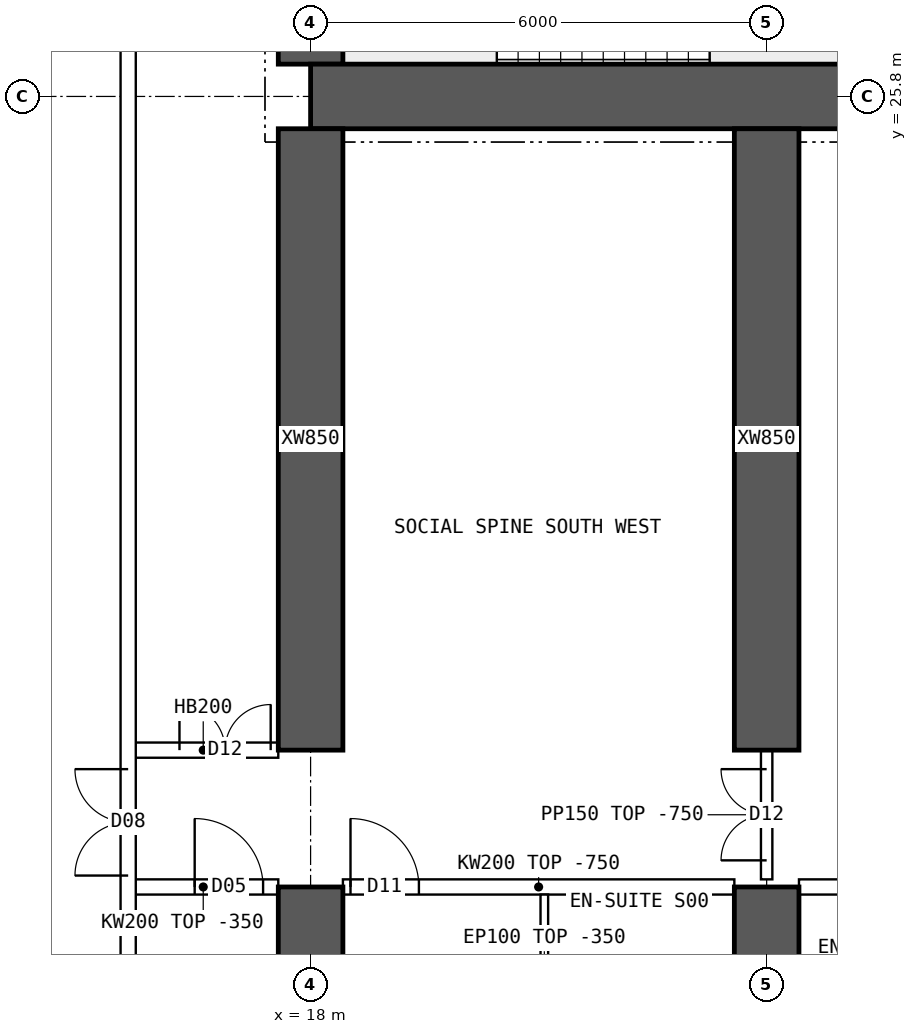
"""IFC4 building model, lengths in metres.
Left out: names, types, materials, properties, quantities, classifications, styles, units other than length and angle.
Written with IfcOpenShell. Run it as: python <this file> out.ifc"""

import sys

from ifc_helpers import new_model, si_unit, direction, frame, frame_2d, origin, place, context, subcontext, project, spatial, polyline, rectangle, outline, extrude, element, fill, save


model = new_model("IFC4")
c1 = context("Model", 3, precision=1e-05, world=origin(), true_north=direction((0.0, 1.0)))
c2 = subcontext(c1, "Body", "Model", "MODEL_VIEW")
j1 = project(units=[si_unit("LENGTHUNIT", "METRE"), si_unit("PLANEANGLEUNIT", "RADIAN")], contexts=[c1])
p1 = place(None, origin())
s1 = spatial("IfcSite", under=j1, at=p1, CompositionType="ELEMENT")
p2 = place(p1, origin())
s2 = spatial("IfcBuilding", under=s1, at=p2, CompositionType="ELEMENT")
p3 = place(p2, frame((0.0, 0.0, 197.35)))
s3 = spatial("IfcBuildingStorey", under=s2, at=p3, CompositionType="ELEMENT", Elevation=197.35)
p4 = place(p3, frame((18.0, 25.8, 0.0), z_axis=(0.0, 0.0, 1.0), x_axis=(1.0, 0.0, 0.0)))
e1 = element("IfcWall", 1, at=p4, inside=s3, PredefinedType="SHEAR", context=c2, shape_type="SweptSolid", body=[
    extrude(rectangle(XDim=48.0, YDim=0.85, at=frame_2d((24.0, 0.0))), origin(), (0.0, 0.0, 1.0), 3.75),
])
p5 = place(p3, frame((18.0, 26.225, 0.0), z_axis=(0.0, 0.0, 1.0), x_axis=(0.0, 1.0, 0.0)))
e2 = element("IfcWall", 2, at=p5, inside=s3, PredefinedType="SHEAR", context=c2, shape_type="SweptSolid", body=[
    extrude(rectangle(XDim=11.55, YDim=0.85, at=frame_2d((5.775, 0.0))), origin(), (0.0, 0.0, 1.0), 3.75),
])
p6 = place(p5, frame((5.075, 0.0, 0.0)))
e3 = element("IfcOpeningElement", 3, at=p6, cuts=e2, PredefinedType="OPENING", context=c2, shape_type="SweptSolid", body=[
    extrude(rectangle(XDim=1.2, YDim=2.1, at=frame_2d((0.6, 1.05))), frame((0.0, 0.435, 0.0), z_axis=(0.0, -1.0, 0.0), x_axis=(1.0, 0.0, 0.0)), (0.0, 0.0, 1.0), 0.87),
])
p7 = place(p3, frame((18.0, 10.0, 0.0), z_axis=(0.0, 0.0, 1.0), x_axis=(0.0, 1.0, 0.0)))
e4 = element("IfcWall", 4, at=p7, inside=s3, PredefinedType="SHEAR", context=c2, shape_type="SweptSolid", body=[
    extrude(rectangle(XDim=5.4, YDim=0.85, at=frame_2d((2.7, 0.0))), origin(), (0.0, 0.0, 1.0), 3.75),
])
p8 = place(p3, frame((18.0, 17.2, 0.0), z_axis=(0.0, 0.0, 1.0), x_axis=(0.0, 1.0, 0.0)))
e5 = element("IfcWall", 5, at=p8, inside=s3, PredefinedType="SHEAR", context=c2, shape_type="SweptSolid", body=[
    extrude(rectangle(XDim=8.175, YDim=0.85, at=frame_2d((4.087, 0.0))), origin(), (0.0, 0.0, 1.0), 3.75),
])
p9 = place(p3, frame((24.0, 10.0, 0.0), z_axis=(0.0, 0.0, 1.0), x_axis=(0.0, 1.0, 0.0)))
e6 = element("IfcWall", 6, at=p9, inside=s3, PredefinedType="SHEAR", context=c2, shape_type="SweptSolid", body=[
    extrude(rectangle(XDim=5.4, YDim=0.85, at=frame_2d((2.7, 0.0))), origin(), (0.0, 0.0, 1.0), 3.75),
])
p10 = place(p3, frame((24.0, 17.2, 0.0), z_axis=(0.0, 0.0, 1.0), x_axis=(0.0, 1.0, 0.0)))
e7 = element("IfcWall", 7, at=p10, inside=s3, PredefinedType="SHEAR", context=c2, shape_type="SweptSolid", body=[
    extrude(rectangle(XDim=8.175, YDim=0.85, at=frame_2d((4.087, 0.0))), origin(), (0.0, 0.0, 1.0), 3.75),
])
p11 = place(p3, frame((15.6, 15.4, 0.0), z_axis=(0.0, 0.0, 1.0), x_axis=(1.0, 0.0, 0.0)))
e8 = element("IfcWall", 8, at=p11, inside=s3, PredefinedType="SOLIDWALL", context=c2, shape_type="SweptSolid", body=[
    extrude(rectangle(XDim=1.975, YDim=0.2, at=frame_2d((0.987, 0.0))), origin(), (0.0, 0.0, 1.0), 3.4),
])
p12 = place(p11, frame((0.875, 0.0, 0.0)))
e9 = element("IfcOpeningElement", 9, at=p12, cuts=e8, PredefinedType="OPENING", context=c2, shape_type="SweptSolid", body=[
    extrude(rectangle(XDim=0.9, YDim=2.1, at=frame_2d((0.45, 1.05))), frame((0.0, 0.11, 0.0), z_axis=(0.0, -1.0, 0.0), x_axis=(1.0, 0.0, 0.0)), (0.0, 0.0, 1.0), 0.22),
])
p13 = place(p3, frame((15.6, 17.2, 0.0), z_axis=(0.0, 0.0, 1.0), x_axis=(1.0, 0.0, 0.0)))
e10 = element("IfcWall", 10, at=p13, inside=s3, PredefinedType="SOLIDWALL", context=c2, shape_type="SweptSolid", body=[
    extrude(rectangle(XDim=1.975, YDim=0.2, at=frame_2d((0.987, 0.0))), origin(), (0.0, 0.0, 1.0), 3.4),
])
p14 = place(p13, frame((0.675, 0.0, 0.0)))
e11 = element("IfcOpeningElement", 11, at=p14, cuts=e10, PredefinedType="OPENING", context=c2, shape_type="SweptSolid", body=[
    extrude(rectangle(XDim=1.2, YDim=2.1, at=frame_2d((0.6, 1.05))), frame((0.0, 0.11, 0.0), z_axis=(0.0, -1.0, 0.0), x_axis=(1.0, 0.0, 0.0)), (0.0, 0.0, 1.0), 0.22),
])
p15 = place(p3, frame((18.425, 15.4, 0.0), z_axis=(0.0, 0.0, 1.0), x_axis=(1.0, 0.0, 0.0)))
e12 = element("IfcWall", 12, at=p15, inside=s3, PredefinedType="SOLIDWALL", context=c2, shape_type="SweptSolid", body=[
    extrude(outline(polyline([(0.0, 0.0), (5.15, 0.0), (5.15, 3.0), (0.0, 3.0), (0.0, 0.0)])), frame((0.0, 0.1, 0.0), z_axis=(0.0, -1.0, 0.0), x_axis=(1.0, 0.0, 0.0)), (0.0, 0.0, 1.0), 0.2),
])
p16 = place(p15, frame((0.1, 0.0, 0.0)))
e13 = element("IfcOpeningElement", 13, at=p16, cuts=e12, PredefinedType="OPENING", context=c2, shape_type="SweptSolid", body=[
    extrude(rectangle(XDim=0.9, YDim=2.1, at=frame_2d((0.45, 1.05))), frame((0.0, 0.11, 0.0), z_axis=(0.0, -1.0, 0.0), x_axis=(1.0, 0.0, 0.0)), (0.0, 0.0, 1.0), 0.22),
])
p17 = place(p3, frame((24.425, 15.4, 0.0), z_axis=(0.0, 0.0, 1.0), x_axis=(1.0, 0.0, 0.0)))
e14 = element("IfcWall", 14, at=p17, inside=s3, PredefinedType="SOLIDWALL", context=c2, shape_type="SweptSolid", body=[
    extrude(outline(polyline([(0.0, 0.0), (5.15, 0.0), (5.15, 3.0), (0.0, 3.0), (0.0, 0.0)])), frame((0.0, 0.1, 0.0), z_axis=(0.0, -1.0, 0.0), x_axis=(1.0, 0.0, 0.0)), (0.0, 0.0, 1.0), 0.2),
])
p18 = place(p17, frame((1.3, 0.0, 0.0)))
e15 = element("IfcOpeningElement", 15, at=p18, cuts=e14, PredefinedType="OPENING", context=c2, shape_type="SweptSolid", body=[
    extrude(rectangle(XDim=0.9, YDim=2.1, at=frame_2d((0.45, 1.05))), frame((0.0, 0.11, 0.0), z_axis=(0.0, -1.0, 0.0), x_axis=(1.0, 0.0, 0.0)), (0.0, 0.0, 1.0), 0.22),
])
p19 = place(p17, frame((2.75, 0.0, 0.0)))
e16 = element("IfcOpeningElement", 16, at=p19, cuts=e14, PredefinedType="OPENING", context=c2, shape_type="SweptSolid", body=[
    extrude(rectangle(XDim=0.9, YDim=2.1, at=frame_2d((0.45, 1.05))), frame((0.0, 0.11, 0.0), z_axis=(0.0, -1.0, 0.0), x_axis=(1.0, 0.0, 0.0)), (0.0, 0.0, 1.0), 0.22),
])
p20 = place(p3, frame((21.075, 13.55, 0.0), z_axis=(0.0, 0.0, 1.0), x_axis=(0.0, 1.0, 0.0)))
e17 = element("IfcWall", 17, at=p20, inside=s3, PredefinedType="PARTITIONING", context=c2, shape_type="SweptSolid", body=[
    extrude(outline(polyline([(0.0, 0.0), (1.75, 0.0), (1.75, 3.0), (1.702, 3.0), (1.7, 3.4), (0.0, 3.4), (0.0, 0.0)])), frame((0.0, 0.05, 0.0), z_axis=(0.0, -1.0, 0.0), x_axis=(1.0, 0.0, 0.0)), (0.0, 0.0, 1.0), 0.1),
])
p21 = place(p3, frame((24.0, 15.5, 0.0), z_axis=(0.0, 0.0, 1.0), x_axis=(0.0, 1.0, 0.0)))
e18 = element("IfcWall", 18, at=p21, inside=s3, PredefinedType="PARTITIONING", context=c2, shape_type="SweptSolid", body=[
    extrude(outline(polyline([(0.0, 0.0), (1.7, 0.0), (1.7, 3.0), (0.0, 3.0), (0.0, 0.0)])), frame((0.0, 0.075, 0.0), z_axis=(0.0, -1.0, 0.0), x_axis=(1.0, 0.0, 0.0)), (0.0, 0.0, 1.0), 0.15),
])
p22 = place(p21, frame((0.25, 0.0, 0.0)))
e19 = element("IfcOpeningElement", 19, at=p22, cuts=e18, PredefinedType="OPENING", context=c2, shape_type="SweptSolid", body=[
    extrude(rectangle(XDim=1.2, YDim=2.1, at=frame_2d((0.6, 1.05))), frame((0.0, 0.085, 0.0), z_axis=(0.0, -1.0, 0.0), x_axis=(1.0, 0.0, 0.0)), (0.0, 0.0, 1.0), 0.17),
])
p23 = place(p3, frame((15.6, 10.446, 0.0), z_axis=(0.0, 0.0, 1.0), x_axis=(0.0, 1.0, 0.0)))
e20 = element("IfcWall", 20, at=p23, inside=s3, PredefinedType="SOLIDWALL", context=c2, shape_type="SweptSolid", body=[
    extrude(rectangle(XDim=43.107, YDim=0.2, at=frame_2d((21.554, 0.0))), origin(), (0.0, 0.0, 1.0), 3.4),
])
p24 = place(p23, frame((5.104, 0.0, 0.0)))
e21 = element("IfcOpeningElement", 21, at=p24, cuts=e20, PredefinedType="OPENING", context=c2, shape_type="SweptSolid", body=[
    extrude(rectangle(XDim=1.4, YDim=2.1, at=frame_2d((0.7, 1.05))), frame((0.0, 0.11, 0.0), z_axis=(0.0, -1.0, 0.0), x_axis=(1.0, 0.0, 0.0)), (0.0, 0.0, 1.0), 0.22),
])
p25 = place(p23, frame((36.504, 0.0, 0.0)))
e22 = element("IfcOpeningElement", 22, at=p25, cuts=e20, PredefinedType="OPENING", context=c2, shape_type="SweptSolid", body=[
    extrude(rectangle(XDim=1.4, YDim=2.1, at=frame_2d((0.7, 1.05))), frame((0.0, 0.11, 0.0), z_axis=(0.0, -1.0, 0.0), x_axis=(1.0, 0.0, 0.0)), (0.0, 0.0, 1.0), 0.22),
])
p26 = place(p14, origin())
e23 = element("IfcDoor", 23, at=p26, inside=s3, OperationType="DOUBLE_DOOR_SINGLE_SWING", PredefinedType="DOOR", context=c2, shape_type="SweptSolid", body=[
    extrude(rectangle(XDim=1.2, YDim=2.1, at=frame_2d((0.6, 1.05))), frame((0.0, 0.025, 0.0), z_axis=(0.0, -1.0, 0.0), x_axis=(1.0, 0.0, 0.0)), (0.0, 0.0, 1.0), 0.05),
])
fill(e11, e23)
p27 = place(p16, origin())
e24 = element("IfcDoor", 24, at=p27, inside=s3, OperationType="SINGLE_SWING_LEFT", PredefinedType="DOOR", context=c2, shape_type="SweptSolid", body=[
    extrude(rectangle(XDim=0.9, YDim=2.1, at=frame_2d((0.45, 1.05))), frame((0.0, 0.025, 0.0), z_axis=(0.0, -1.0, 0.0), x_axis=(1.0, 0.0, 0.0)), (0.0, 0.0, 1.0), 0.05),
])
fill(e13, e24)
p28 = place(p22, origin())
e25 = element("IfcDoor", 25, at=p28, inside=s3, OperationType="DOUBLE_DOOR_SINGLE_SWING", PredefinedType="DOOR", context=c2, shape_type="SweptSolid", body=[
    extrude(rectangle(XDim=1.2, YDim=2.1, at=frame_2d((0.6, 1.05))), frame((0.0, 0.025, 0.0), z_axis=(0.0, -1.0, 0.0), x_axis=(1.0, 0.0, 0.0)), (0.0, 0.0, 1.0), 0.05),
])
fill(e19, e25)
p29 = place(p24, origin())
e26 = element("IfcDoor", 26, at=p29, inside=s3, OperationType="DOUBLE_DOOR_SINGLE_SWING", PredefinedType="DOOR", context=c2, shape_type="SweptSolid", body=[
    extrude(rectangle(XDim=1.4, YDim=2.1, at=frame_2d((0.7, 1.05))), frame((0.0, 0.025, 0.0), z_axis=(0.0, -1.0, 0.0), x_axis=(1.0, 0.0, 0.0)), (0.0, 0.0, 1.0), 0.05),
])
fill(e21, e26)
p30 = place(p12, origin())
e27 = element("IfcDoor", 27, at=p30, inside=s3, OperationType="SINGLE_SWING_LEFT", PredefinedType="DOOR", context=c2, shape_type="SweptSolid", body=[
    extrude(rectangle(XDim=0.9, YDim=2.1, at=frame_2d((0.45, 1.05))), frame((0.0, 0.025, 0.0), z_axis=(0.0, -1.0, 0.0), x_axis=(1.0, 0.0, 0.0)), (0.0, 0.0, 1.0), 0.05),
])
fill(e9, e27)
save(model, sys.argv[1])
